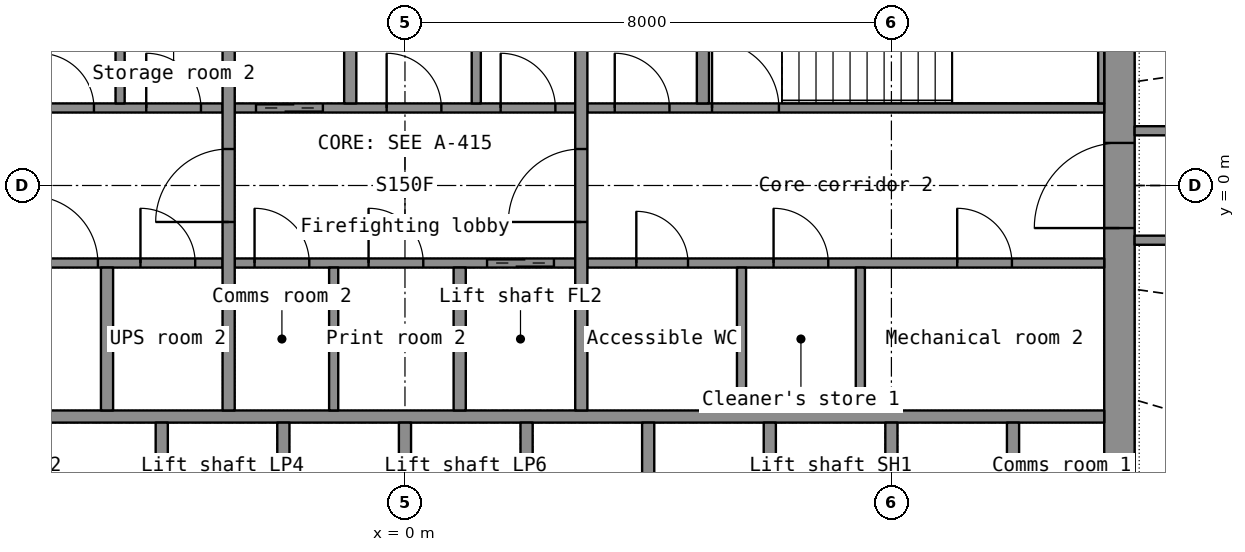
"""IFC4 building model, lengths in metres.
Left out: names, types, materials, properties, quantities, classifications, styles, units other than length and angle.
Written with IfcOpenShell. Run it as: python <this file> out.ifc"""

import sys

from ifc_helpers import new_model, si_unit, direction, frame, frame_2d, origin, place, context, subcontext, project, spatial, rectangle, extrude, element, fill, save


model = new_model("IFC4")
c1 = context("Model", 3, precision=1e-05, world=origin(), true_north=direction((0.0, 1.0)))
c2 = subcontext(c1, "Body", "Model", "MODEL_VIEW")
j1 = project(units=[si_unit("LENGTHUNIT", "METRE"), si_unit("PLANEANGLEUNIT", "RADIAN")], contexts=[c1])
p1 = place(None, origin())
s1 = spatial("IfcSite", under=j1, at=p1, CompositionType="ELEMENT")
p2 = place(p1, origin())
s2 = spatial("IfcBuilding", under=s1, at=p2, CompositionType="ELEMENT")
p3 = place(p2, frame((0.0, 0.0, 104.5)))
s3 = spatial("IfcBuildingStorey", under=s2, at=p3, CompositionType="ELEMENT", Elevation=104.5)
p4 = place(p3, frame((11.75, -7.2, 0.0), z_axis=(0.0, 0.0, 1.0), x_axis=(0.0, 1.0, 0.0)))
e1 = element("IfcWall", 1, at=p4, inside=s3, PredefinedType="SHEAR", context=c2, shape_type="SweptSolid", body=[
    extrude(rectangle(XDim=14.4, YDim=0.5, at=frame_2d((7.2, 0.0))), origin(), (0.0, 0.0, 1.0), 3.3),
])
p5 = place(p4, frame((6.5, 0.0, 0.0)))
e2 = element("IfcOpeningElement", 2, at=p5, cuts=e1, PredefinedType="OPENING", context=c2, shape_type="SweptSolid", body=[
    extrude(rectangle(XDim=1.4, YDim=2.2, at=frame_2d((0.7, 1.1))), frame((0.0, 0.26, 0.0), z_axis=(0.0, -1.0, 0.0), x_axis=(1.0, 0.0, 0.0)), (0.0, 0.0, 1.0), 0.52),
])
p6 = place(p3, frame((-11.5, -3.8, 0.0), z_axis=(0.0, 0.0, 1.0), x_axis=(1.0, 0.0, 0.0)))
e3 = element("IfcWall", 3, at=p6, inside=s3, PredefinedType="SHEAR", context=c2, shape_type="SweptSolid", body=[
    extrude(rectangle(XDim=23.0, YDim=0.2, at=frame_2d((11.5, 0.0))), origin(), (0.0, 0.0, 1.0), 3.3),
])
for number, where, z_axis, x_axis in (
    (4, (-4.0, -6.7, 0.0), (0.0, 0.0, 1.0), (0.0, 1.0, 0.0)),
    (5, (-2.0, -6.7, 0.0), (0.0, 0.0, 1.0), (0.0, 1.0, 0.0)),
    (6, (0.0, -6.7, 0.0), (0.0, 0.0, 1.0), (0.0, 1.0, 0.0)),
    (7, (2.0, -6.7, 0.0), (0.0, 0.0, 1.0), (0.0, 1.0, 0.0)),
    (8, (4.0, -6.7, 0.0), (0.0, 0.0, 1.0), (0.0, 1.0, 0.0)),
    (9, (6.0, -6.7, 0.0), (0.0, 0.0, 1.0), (0.0, 1.0, 0.0)),
    (10, (8.0, -6.7, 0.0), (0.0, 0.0, 1.0), (0.0, 1.0, 0.0)),
    (11, (10.0, -6.7, 0.0), (0.0, 0.0, 1.0), (0.0, 1.0, 0.0)),
):
    element("IfcWall", number, at=place(p3, frame(where, z_axis=z_axis, x_axis=x_axis)), inside=s3, PredefinedType="SHEAR", context=c2, shape_type="SweptSolid", body=[
        extrude(rectangle(XDim=2.8, YDim=0.2, at=frame_2d((1.4, 0.0))), origin(), (0.0, 0.0, 1.0), 3.3),
    ])
p7 = place(p3, frame((-11.5, -1.275, 0.0), z_axis=(0.0, 0.0, 1.0), x_axis=(1.0, 0.0, 0.0)))
e12 = element("IfcWall", 12, at=p7, inside=s3, PredefinedType="SHEAR", context=c2, shape_type="SweptSolid", body=[
    extrude(rectangle(XDim=8.5, YDim=0.15, at=frame_2d((4.25, 0.0))), origin(), (0.0, 0.0, 1.0), 3.3),
])
p8 = place(p7, frame((5.35, 0.0, 0.0)))
e13 = element("IfcOpeningElement", 13, at=p8, cuts=e12, PredefinedType="OPENING", context=c2, shape_type="SweptSolid", body=[
    extrude(rectangle(XDim=1.1, YDim=2.15, at=frame_2d((0.55, 1.075))), frame((0.0, 0.085, 0.0), z_axis=(0.0, -1.0, 0.0), x_axis=(1.0, 0.0, 0.0)), (0.0, 0.0, 1.0), 0.17),
])
p9 = place(p7, frame((7.15, 0.0, 0.0)))
e14 = element("IfcOpeningElement", 14, at=p9, cuts=e12, PredefinedType="OPENING", context=c2, shape_type="SweptSolid", body=[
    extrude(rectangle(XDim=0.9, YDim=2.1, at=frame_2d((0.45, 1.05))), frame((0.0, 0.085, 0.0), z_axis=(0.0, -1.0, 0.0), x_axis=(1.0, 0.0, 0.0)), (0.0, 0.0, 1.0), 0.17),
])
p10 = place(p3, frame((-2.8, -1.275, 0.0), z_axis=(0.0, 0.0, 1.0), x_axis=(1.0, 0.0, 0.0)))
e15 = element("IfcWall", 15, at=p10, inside=s3, PredefinedType="SHEAR", context=c2, shape_type="SweptSolid", body=[
    extrude(rectangle(XDim=5.6, YDim=0.15, at=frame_2d((2.8, 0.0))), origin(), (0.0, 0.0, 1.0), 3.3),
])
p11 = place(p10, frame((4.15, 0.0, 0.0)))
e16 = element("IfcOpeningElement", 16, at=p11, cuts=e15, PredefinedType="OPENING", context=c2, shape_type="SweptSolid", body=[
    extrude(rectangle(XDim=1.1, YDim=2.2, at=frame_2d((0.55, 1.1))), frame((0.0, 0.085, 0.0), z_axis=(0.0, -1.0, 0.0), x_axis=(1.0, 0.0, 0.0)), (0.0, 0.0, 1.0), 0.17),
])
p12 = place(p10, frame((0.326, 0.0, 0.0)))
e17 = element("IfcOpeningElement", 17, at=p12, cuts=e15, PredefinedType="OPENING", context=c2, shape_type="SweptSolid", body=[
    extrude(rectangle(XDim=0.9, YDim=2.1, at=frame_2d((0.45, 1.05))), frame((0.0, 0.085, 0.0), z_axis=(0.0, -1.0, 0.0), x_axis=(1.0, 0.0, 0.0)), (0.0, 0.0, 1.0), 0.17),
])
p13 = place(p10, frame((2.201, 0.0, 0.0)))
e18 = element("IfcOpeningElement", 18, at=p13, cuts=e15, PredefinedType="OPENING", context=c2, shape_type="SweptSolid", body=[
    extrude(rectangle(XDim=0.9, YDim=2.1, at=frame_2d((0.45, 1.05))), frame((0.0, 0.085, 0.0), z_axis=(0.0, -1.0, 0.0), x_axis=(1.0, 0.0, 0.0)), (0.0, 0.0, 1.0), 0.17),
])
p14 = place(p3, frame((3.0, -1.275, 0.0), z_axis=(0.0, 0.0, 1.0), x_axis=(1.0, 0.0, 0.0)))
e19 = element("IfcWall", 19, at=p14, inside=s3, PredefinedType="PARTITIONING", context=c2, shape_type="SweptSolid", body=[
    extrude(rectangle(XDim=8.5, YDim=0.15, at=frame_2d((4.25, 0.0))), origin(), (0.0, 0.0, 1.0), 3.3),
])
p15 = place(p14, frame((0.805, 0.0, 0.0)))
e20 = element("IfcOpeningElement", 20, at=p15, cuts=e19, PredefinedType="OPENING", context=c2, shape_type="SweptSolid", body=[
    extrude(rectangle(XDim=0.85, YDim=2.1, at=frame_2d((0.425, 1.05))), frame((0.0, 0.085, 0.0), z_axis=(0.0, -1.0, 0.0), x_axis=(1.0, 0.0, 0.0)), (0.0, 0.0, 1.0), 0.17),
])
p16 = place(p14, frame((3.062, 0.0, 0.0)))
e21 = element("IfcOpeningElement", 21, at=p16, cuts=e19, PredefinedType="OPENING", context=c2, shape_type="SweptSolid", body=[
    extrude(rectangle(XDim=0.9, YDim=2.1, at=frame_2d((0.45, 1.05))), frame((0.0, 0.085, 0.0), z_axis=(0.0, -1.0, 0.0), x_axis=(1.0, 0.0, 0.0)), (0.0, 0.0, 1.0), 0.17),
])
p17 = place(p14, frame((6.082, 0.0, 0.0)))
e22 = element("IfcOpeningElement", 22, at=p17, cuts=e19, PredefinedType="OPENING", context=c2, shape_type="SweptSolid", body=[
    extrude(rectangle(XDim=0.9, YDim=2.1, at=frame_2d((0.45, 1.05))), frame((0.0, 0.085, 0.0), z_axis=(0.0, -1.0, 0.0), x_axis=(1.0, 0.0, 0.0)), (0.0, 0.0, 1.0), 0.17),
])
p18 = place(p3, frame((-11.5, 1.275, 0.0), z_axis=(0.0, 0.0, 1.0), x_axis=(1.0, 0.0, 0.0)))
e23 = element("IfcWall", 23, at=p18, inside=s3, PredefinedType="PARTITIONING", context=c2, shape_type="SweptSolid", body=[
    extrude(rectangle(XDim=8.5, YDim=0.15, at=frame_2d((4.25, 0.0))), origin(), (0.0, 0.0, 1.0), 3.3),
])
p19 = place(p18, frame((0.782, 0.0, 0.0)))
e24 = element("IfcOpeningElement", 24, at=p19, cuts=e23, PredefinedType="OPENING", context=c2, shape_type="SweptSolid", body=[
    extrude(rectangle(XDim=0.85, YDim=2.1, at=frame_2d((0.425, 1.05))), frame((0.0, 0.085, 0.0), z_axis=(0.0, -1.0, 0.0), x_axis=(1.0, 0.0, 0.0)), (0.0, 0.0, 1.0), 0.17),
])
p20 = place(p18, frame((3.347, 0.0, 0.0)))
e25 = element("IfcOpeningElement", 25, at=p20, cuts=e23, PredefinedType="OPENING", context=c2, shape_type="SweptSolid", body=[
    extrude(rectangle(XDim=0.85, YDim=2.1, at=frame_2d((0.425, 1.05))), frame((0.0, 0.085, 0.0), z_axis=(0.0, -1.0, 0.0), x_axis=(1.0, 0.0, 0.0)), (0.0, 0.0, 1.0), 0.17),
])
p21 = place(p18, frame((5.485, 0.0, 0.0)))
e26 = element("IfcOpeningElement", 26, at=p21, cuts=e23, PredefinedType="OPENING", context=c2, shape_type="SweptSolid", body=[
    extrude(rectangle(XDim=0.9, YDim=2.1, at=frame_2d((0.45, 1.05))), frame((0.0, 0.085, 0.0), z_axis=(0.0, -1.0, 0.0), x_axis=(1.0, 0.0, 0.0)), (0.0, 0.0, 1.0), 0.17),
])
p22 = place(p18, frame((7.245, 0.0, 0.0)))
e27 = element("IfcOpeningElement", 27, at=p22, cuts=e23, PredefinedType="OPENING", context=c2, shape_type="SweptSolid", body=[
    extrude(rectangle(XDim=0.9, YDim=2.1, at=frame_2d((0.45, 1.05))), frame((0.0, 0.085, 0.0), z_axis=(0.0, -1.0, 0.0), x_axis=(1.0, 0.0, 0.0)), (0.0, 0.0, 1.0), 0.17),
])
p23 = place(p3, frame((-2.8, 1.275, 0.0), z_axis=(0.0, 0.0, 1.0), x_axis=(1.0, 0.0, 0.0)))
e28 = element("IfcWall", 28, at=p23, inside=s3, PredefinedType="SHEAR", context=c2, shape_type="SweptSolid", body=[
    extrude(rectangle(XDim=5.6, YDim=0.15, at=frame_2d((2.8, 0.0))), origin(), (0.0, 0.0, 1.0), 3.3),
])
p24 = place(p23, frame((0.35, 0.0, 0.0)))
e29 = element("IfcOpeningElement", 29, at=p24, cuts=e28, PredefinedType="OPENING", context=c2, shape_type="SweptSolid", body=[
    extrude(rectangle(XDim=1.1, YDim=2.2, at=frame_2d((0.55, 1.1))), frame((0.0, 0.085, 0.0), z_axis=(0.0, -1.0, 0.0), x_axis=(1.0, 0.0, 0.0)), (0.0, 0.0, 1.0), 0.17),
])
p25 = place(p23, frame((2.499, 0.0, 0.0)))
e30 = element("IfcOpeningElement", 30, at=p25, cuts=e28, PredefinedType="OPENING", context=c2, shape_type="SweptSolid", body=[
    extrude(rectangle(XDim=0.9, YDim=2.1, at=frame_2d((0.45, 1.05))), frame((0.0, 0.085, 0.0), z_axis=(0.0, -1.0, 0.0), x_axis=(1.0, 0.0, 0.0)), (0.0, 0.0, 1.0), 0.17),
])
p26 = place(p23, frame((4.374, 0.0, 0.0)))
e31 = element("IfcOpeningElement", 31, at=p26, cuts=e28, PredefinedType="OPENING", context=c2, shape_type="SweptSolid", body=[
    extrude(rectangle(XDim=0.9, YDim=2.1, at=frame_2d((0.45, 1.05))), frame((0.0, 0.085, 0.0), z_axis=(0.0, -1.0, 0.0), x_axis=(1.0, 0.0, 0.0)), (0.0, 0.0, 1.0), 0.17),
])
p27 = place(p3, frame((3.0, 1.275, 0.0), z_axis=(0.0, 0.0, 1.0), x_axis=(1.0, 0.0, 0.0)))
e32 = element("IfcWall", 32, at=p27, inside=s3, PredefinedType="SHEAR", context=c2, shape_type="SweptSolid", body=[
    extrude(rectangle(XDim=8.5, YDim=0.15, at=frame_2d((4.25, 0.0))), origin(), (0.0, 0.0, 1.0), 3.3),
])
p28 = place(p27, frame((2.05, 0.0, 0.0)))
e33 = element("IfcOpeningElement", 33, at=p28, cuts=e32, PredefinedType="OPENING", context=c2, shape_type="SweptSolid", body=[
    extrude(rectangle(XDim=1.1, YDim=2.15, at=frame_2d((0.55, 1.075))), frame((0.0, 0.085, 0.0), z_axis=(0.0, -1.0, 0.0), x_axis=(1.0, 0.0, 0.0)), (0.0, 0.0, 1.0), 0.17),
])
p29 = place(p27, frame((0.45, 0.0, 0.0)))
e34 = element("IfcOpeningElement", 34, at=p29, cuts=e32, PredefinedType="OPENING", context=c2, shape_type="SweptSolid", body=[
    extrude(rectangle(XDim=0.9, YDim=2.1, at=frame_2d((0.45, 1.05))), frame((0.0, 0.085, 0.0), z_axis=(0.0, -1.0, 0.0), x_axis=(1.0, 0.0, 0.0)), (0.0, 0.0, 1.0), 0.17),
])
p30 = place(p3, frame((-2.9, -3.7, 0.0), z_axis=(0.0, 0.0, 1.0), x_axis=(0.0, 1.0, 0.0)))
e35 = element("IfcWall", 35, at=p30, inside=s3, PredefinedType="SHEAR", context=c2, shape_type="SweptSolid", body=[
    extrude(rectangle(XDim=7.4, YDim=0.2, at=frame_2d((3.7, 0.0))), origin(), (0.0, 0.0, 1.0), 3.3),
])
p31 = place(p30, frame((3.1, 0.0, 0.0)))
e36 = element("IfcOpeningElement", 36, at=p31, cuts=e35, PredefinedType="OPENING", context=c2, shape_type="SweptSolid", body=[
    extrude(rectangle(XDim=1.2, YDim=2.2, at=frame_2d((0.6, 1.1))), frame((0.0, 0.11, 0.0), z_axis=(0.0, -1.0, 0.0), x_axis=(1.0, 0.0, 0.0)), (0.0, 0.0, 1.0), 0.22),
])
p32 = place(p3, frame((2.9, -3.7, 0.0), z_axis=(0.0, 0.0, 1.0), x_axis=(0.0, 1.0, 0.0)))
e37 = element("IfcWall", 37, at=p32, inside=s3, PredefinedType="SHEAR", context=c2, shape_type="SweptSolid", body=[
    extrude(rectangle(XDim=7.4, YDim=0.2, at=frame_2d((3.7, 0.0))), origin(), (0.0, 0.0, 1.0), 3.3),
])
p33 = place(p32, frame((3.1, 0.0, 0.0)))
e38 = element("IfcOpeningElement", 38, at=p33, cuts=e37, PredefinedType="OPENING", context=c2, shape_type="SweptSolid", body=[
    extrude(rectangle(XDim=1.2, YDim=2.2, at=frame_2d((0.6, 1.1))), frame((0.0, 0.11, 0.0), z_axis=(0.0, -1.0, 0.0), x_axis=(1.0, 0.0, 0.0)), (0.0, 0.0, 1.0), 0.22),
])
for number, where, z_axis, x_axis in (
    (39, (-0.9, 1.35, 0.0), (0.0, 0.0, 1.0), (0.0, 1.0, 0.0)),
    (40, (0.9, -3.7, 0.0), (0.0, 0.0, 1.0), (0.0, 1.0, 0.0)),
):
    element("IfcWall", number, at=place(p3, frame(where, z_axis=z_axis, x_axis=x_axis)), inside=s3, PredefinedType="SHEAR", context=c2, shape_type="SweptSolid", body=[
        extrude(rectangle(XDim=2.35, YDim=0.2, at=frame_2d((1.175, 0.0))), origin(), (0.0, 0.0, 1.0), 3.3),
    ])
p34 = place(p3, frame((11.45, 1.35, 0.0), z_axis=(0.0, 0.0, 1.0), x_axis=(0.0, 1.0, 0.0)))
e41 = element("IfcWall", 41, at=p34, inside=s3, PredefinedType="SHEAR", context=c2, shape_type="SweptSolid", body=[
    extrude(rectangle(XDim=2.35, YDim=0.1, at=frame_2d((1.175, 0.0))), origin(), (0.0, 0.0, 1.0), 3.3),
])
for number, where, z_axis, x_axis in (
    (42, (-4.9, -3.7, 0.0), (0.0, 0.0, 1.0), (0.0, 1.0, 0.0)),
    (43, (4.9, 1.35, 0.0), (0.0, 0.0, 1.0), (0.0, 1.0, 0.0)),
):
    element("IfcWall", number, at=place(p3, frame(where, z_axis=z_axis, x_axis=x_axis)), inside=s3, PredefinedType="SHEAR", context=c2, shape_type="SweptSolid", body=[
        extrude(rectangle(XDim=2.35, YDim=0.2, at=frame_2d((1.175, 0.0))), origin(), (0.0, 0.0, 1.0), 3.3),
    ])
for number, where, z_axis, x_axis in (
    (44, (-4.685, 1.35, 0.0), (0.0, 0.0, 1.0), (0.0, 1.0, 0.0)),
    (45, (5.535, -3.7, 0.0), (0.0, 0.0, 1.0), (0.0, 1.0, 0.0)),
    (46, (7.489, -3.7, 0.0), (0.0, 0.0, 1.0), (0.0, 1.0, 0.0)),
    (47, (1.173, 1.35, 0.0), (0.0, 0.0, 1.0), (0.0, 1.0, 0.0)),
    (48, (-1.173, -3.7, 0.0), (0.0, 0.0, 1.0), (0.0, 1.0, 0.0)),
):
    element("IfcWall", number, at=place(p3, frame(where, z_axis=z_axis, x_axis=x_axis)), inside=s3, PredefinedType="PARTITIONING", context=c2, shape_type="SweptSolid", body=[
        extrude(rectangle(XDim=2.35, YDim=0.15, at=frame_2d((1.175, 0.0))), origin(), (0.0, 0.0, 1.0), 3.3),
    ])
p35 = place(p3, frame((16.0, 0.9, 0.0), z_axis=(0.0, 0.0, 1.0), x_axis=(-1.0, 0.0, 0.0)))
e49 = element("IfcWall", 49, at=p35, inside=s3, PredefinedType="PARTITIONING", context=c2, shape_type="SweptSolid", body=[
    extrude(rectangle(XDim=4.0, YDim=0.15, at=frame_2d((2.0, 0.0))), origin(), (0.0, 0.0, 1.0), 2.4),
])
p36 = place(p35, frame((1.5, 0.0, 0.0)))
e50 = element("IfcOpeningElement", 50, at=p36, cuts=e49, PredefinedType="OPENING", context=c2, shape_type="SweptSolid", body=[
    extrude(rectangle(XDim=1.0, YDim=2.2, at=frame_2d((0.5, 1.1))), frame((0.0, 0.085, 0.0), z_axis=(0.0, -1.0, 0.0), x_axis=(1.0, 0.0, 0.0)), (0.0, 0.0, 1.0), 0.17),
])
p37 = place(p3, frame((12.0, -0.9, 0.0), z_axis=(0.0, 0.0, 1.0), x_axis=(1.0, 0.0, 0.0)))
e51 = element("IfcWall", 51, at=p37, inside=s3, PredefinedType="PARTITIONING", context=c2, shape_type="SweptSolid", body=[
    extrude(rectangle(XDim=0.559, YDim=0.15, at=frame_2d((0.279, 0.0))), origin(), (0.0, 0.0, 1.0), 2.4),
])
p38 = place(p5, origin())
e52 = element("IfcDoor", 52, at=p38, inside=s3, OperationType="DOUBLE_DOOR_SINGLE_SWING", PredefinedType="DOOR", context=c2, shape_type="SweptSolid", body=[
    extrude(rectangle(XDim=1.4, YDim=2.2, at=frame_2d((0.7, 1.1))), frame((0.0, 0.025, 0.0), z_axis=(0.0, -1.0, 0.0), x_axis=(1.0, 0.0, 0.0)), (0.0, 0.0, 1.0), 0.05),
])
fill(e2, e52)
p39 = place(p31, origin())
e53 = element("IfcDoor", 53, at=p39, inside=s3, OperationType="SINGLE_SWING_LEFT", PredefinedType="DOOR", context=c2, shape_type="SweptSolid", body=[
    extrude(rectangle(XDim=1.2, YDim=2.2, at=frame_2d((0.6, 1.1))), frame((0.0, 0.025, 0.0), z_axis=(0.0, -1.0, 0.0), x_axis=(1.0, 0.0, 0.0)), (0.0, 0.0, 1.0), 0.05),
])
fill(e36, e53)
p40 = place(p33, origin())
e54 = element("IfcDoor", 54, at=p40, inside=s3, OperationType="SINGLE_SWING_LEFT", PredefinedType="DOOR", context=c2, shape_type="SweptSolid", body=[
    extrude(rectangle(XDim=1.2, YDim=2.2, at=frame_2d((0.6, 1.1))), frame((0.0, 0.025, 0.0), z_axis=(0.0, -1.0, 0.0), x_axis=(1.0, 0.0, 0.0)), (0.0, 0.0, 1.0), 0.05),
])
fill(e38, e54)
p41 = place(p24, origin())
e55 = element("IfcDoor", 55, at=p41, inside=s3, OperationType="DOUBLE_DOOR_SLIDING", PredefinedType="DOOR", context=c2, shape_type="SweptSolid", body=[
    extrude(rectangle(XDim=1.1, YDim=2.2, at=frame_2d((0.55, 1.1))), frame((0.0, 0.025, 0.0), z_axis=(0.0, -1.0, 0.0), x_axis=(1.0, 0.0, 0.0)), (0.0, 0.0, 1.0), 0.05),
])
fill(e29, e55)
p42 = place(p11, origin())
e56 = element("IfcDoor", 56, at=p42, inside=s3, OperationType="DOUBLE_DOOR_SLIDING", PredefinedType="DOOR", context=c2, shape_type="SweptSolid", body=[
    extrude(rectangle(XDim=1.1, YDim=2.2, at=frame_2d((0.55, 1.1))), frame((0.0, 0.025, 0.0), z_axis=(0.0, -1.0, 0.0), x_axis=(1.0, 0.0, 0.0)), (0.0, 0.0, 1.0), 0.05),
])
fill(e16, e56)
p43 = place(p8, origin())
e57 = element("IfcDoor", 57, at=p43, inside=s3, OperationType="SINGLE_SWING_LEFT", PredefinedType="DOOR", context=c2, shape_type="SweptSolid", body=[
    extrude(rectangle(XDim=1.1, YDim=2.15, at=frame_2d((0.55, 1.075))), frame((0.0, 0.025, 0.0), z_axis=(0.0, -1.0, 0.0), x_axis=(1.0, 0.0, 0.0)), (0.0, 0.0, 1.0), 0.05),
])
fill(e13, e57)
p44 = place(p28, origin())
e58 = element("IfcDoor", 58, at=p44, inside=s3, OperationType="SINGLE_SWING_LEFT", PredefinedType="DOOR", context=c2, shape_type="SweptSolid", body=[
    extrude(rectangle(XDim=1.1, YDim=2.15, at=frame_2d((0.55, 1.075))), frame((0.0, 0.025, 0.0), z_axis=(0.0, -1.0, 0.0), x_axis=(1.0, 0.0, 0.0)), (0.0, 0.0, 1.0), 0.05),
])
fill(e33, e58)
p45 = place(p21, origin())
e59 = element("IfcDoor", 59, at=p45, inside=s3, OperationType="SINGLE_SWING_LEFT", PredefinedType="DOOR", context=c2, shape_type="SweptSolid", body=[
    extrude(rectangle(XDim=0.9, YDim=2.1, at=frame_2d((0.45, 1.05))), frame((0.0, 0.025, 0.0), z_axis=(0.0, -1.0, 0.0), x_axis=(1.0, 0.0, 0.0)), (0.0, 0.0, 1.0), 0.05),
])
fill(e26, e59)
p46 = place(p22, origin())
e60 = element("IfcDoor", 60, at=p46, inside=s3, OperationType="SINGLE_SWING_LEFT", PredefinedType="DOOR", context=c2, shape_type="SweptSolid", body=[
    extrude(rectangle(XDim=0.9, YDim=2.1, at=frame_2d((0.45, 1.05))), frame((0.0, 0.025, 0.0), z_axis=(0.0, -1.0, 0.0), x_axis=(1.0, 0.0, 0.0)), (0.0, 0.0, 1.0), 0.05),
])
fill(e27, e60)
p47 = place(p15, origin())
e61 = element("IfcDoor", 61, at=p47, inside=s3, OperationType="SINGLE_SWING_LEFT", PredefinedType="DOOR", context=c2, shape_type="SweptSolid", body=[
    extrude(rectangle(XDim=0.85, YDim=2.1, at=frame_2d((0.425, 1.05))), frame((0.0, 0.025, 0.0), z_axis=(0.0, -1.0, 0.0), x_axis=(1.0, 0.0, 0.0)), (0.0, 0.0, 1.0), 0.05),
])
fill(e20, e61)
p48 = place(p16, origin())
e62 = element("IfcDoor", 62, at=p48, inside=s3, OperationType="SINGLE_SWING_LEFT", PredefinedType="DOOR", context=c2, shape_type="SweptSolid", body=[
    extrude(rectangle(XDim=0.9, YDim=2.1, at=frame_2d((0.45, 1.05))), frame((0.0, 0.025, 0.0), z_axis=(0.0, -1.0, 0.0), x_axis=(1.0, 0.0, 0.0)), (0.0, 0.0, 1.0), 0.05),
])
fill(e21, e62)
p49 = place(p17, origin())
e63 = element("IfcDoor", 63, at=p49, inside=s3, OperationType="SINGLE_SWING_LEFT", PredefinedType="DOOR", context=c2, shape_type="SweptSolid", body=[
    extrude(rectangle(XDim=0.9, YDim=2.1, at=frame_2d((0.45, 1.05))), frame((0.0, 0.025, 0.0), z_axis=(0.0, -1.0, 0.0), x_axis=(1.0, 0.0, 0.0)), (0.0, 0.0, 1.0), 0.05),
])
fill(e22, e63)
p50 = place(p25, origin())
e64 = element("IfcDoor", 64, at=p50, inside=s3, OperationType="SINGLE_SWING_LEFT", PredefinedType="DOOR", context=c2, shape_type="SweptSolid", body=[
    extrude(rectangle(XDim=0.9, YDim=2.1, at=frame_2d((0.45, 1.05))), frame((0.0, 0.025, 0.0), z_axis=(0.0, -1.0, 0.0), x_axis=(1.0, 0.0, 0.0)), (0.0, 0.0, 1.0), 0.05),
])
fill(e30, e64)
p51 = place(p26, origin())
e65 = element("IfcDoor", 65, at=p51, inside=s3, OperationType="SINGLE_SWING_LEFT", PredefinedType="DOOR", context=c2, shape_type="SweptSolid", body=[
    extrude(rectangle(XDim=0.9, YDim=2.1, at=frame_2d((0.45, 1.05))), frame((0.0, 0.025, 0.0), z_axis=(0.0, -1.0, 0.0), x_axis=(1.0, 0.0, 0.0)), (0.0, 0.0, 1.0), 0.05),
])
fill(e31, e65)
p52 = place(p12, origin())
e66 = element("IfcDoor", 66, at=p52, inside=s3, OperationType="SINGLE_SWING_LEFT", PredefinedType="DOOR", context=c2, shape_type="SweptSolid", body=[
    extrude(rectangle(XDim=0.9, YDim=2.1, at=frame_2d((0.45, 1.05))), frame((0.0, 0.025, 0.0), z_axis=(0.0, -1.0, 0.0), x_axis=(1.0, 0.0, 0.0)), (0.0, 0.0, 1.0), 0.05),
])
fill(e17, e66)
p53 = place(p13, origin())
e67 = element("IfcDoor", 67, at=p53, inside=s3, OperationType="SINGLE_SWING_LEFT", PredefinedType="DOOR", context=c2, shape_type="SweptSolid", body=[
    extrude(rectangle(XDim=0.9, YDim=2.1, at=frame_2d((0.45, 1.05))), frame((0.0, 0.025, 0.0), z_axis=(0.0, -1.0, 0.0), x_axis=(1.0, 0.0, 0.0)), (0.0, 0.0, 1.0), 0.05),
])
fill(e18, e67)
p54 = place(p29, origin())
e68 = element("IfcDoor", 68, at=p54, inside=s3, OperationType="SINGLE_SWING_LEFT", PredefinedType="DOOR", context=c2, shape_type="SweptSolid", body=[
    extrude(rectangle(XDim=0.9, YDim=2.1, at=frame_2d((0.45, 1.05))), frame((0.0, 0.025, 0.0), z_axis=(0.0, -1.0, 0.0), x_axis=(1.0, 0.0, 0.0)), (0.0, 0.0, 1.0), 0.05),
])
fill(e34, e68)
p55 = place(p9, origin())
e69 = element("IfcDoor", 69, at=p55, inside=s3, OperationType="SINGLE_SWING_LEFT", PredefinedType="DOOR", context=c2, shape_type="SweptSolid", body=[
    extrude(rectangle(XDim=0.9, YDim=2.1, at=frame_2d((0.45, 1.05))), frame((0.0, 0.025, 0.0), z_axis=(0.0, -1.0, 0.0), x_axis=(1.0, 0.0, 0.0)), (0.0, 0.0, 1.0), 0.05),
])
fill(e14, e69)
save(model, sys.argv[1])
